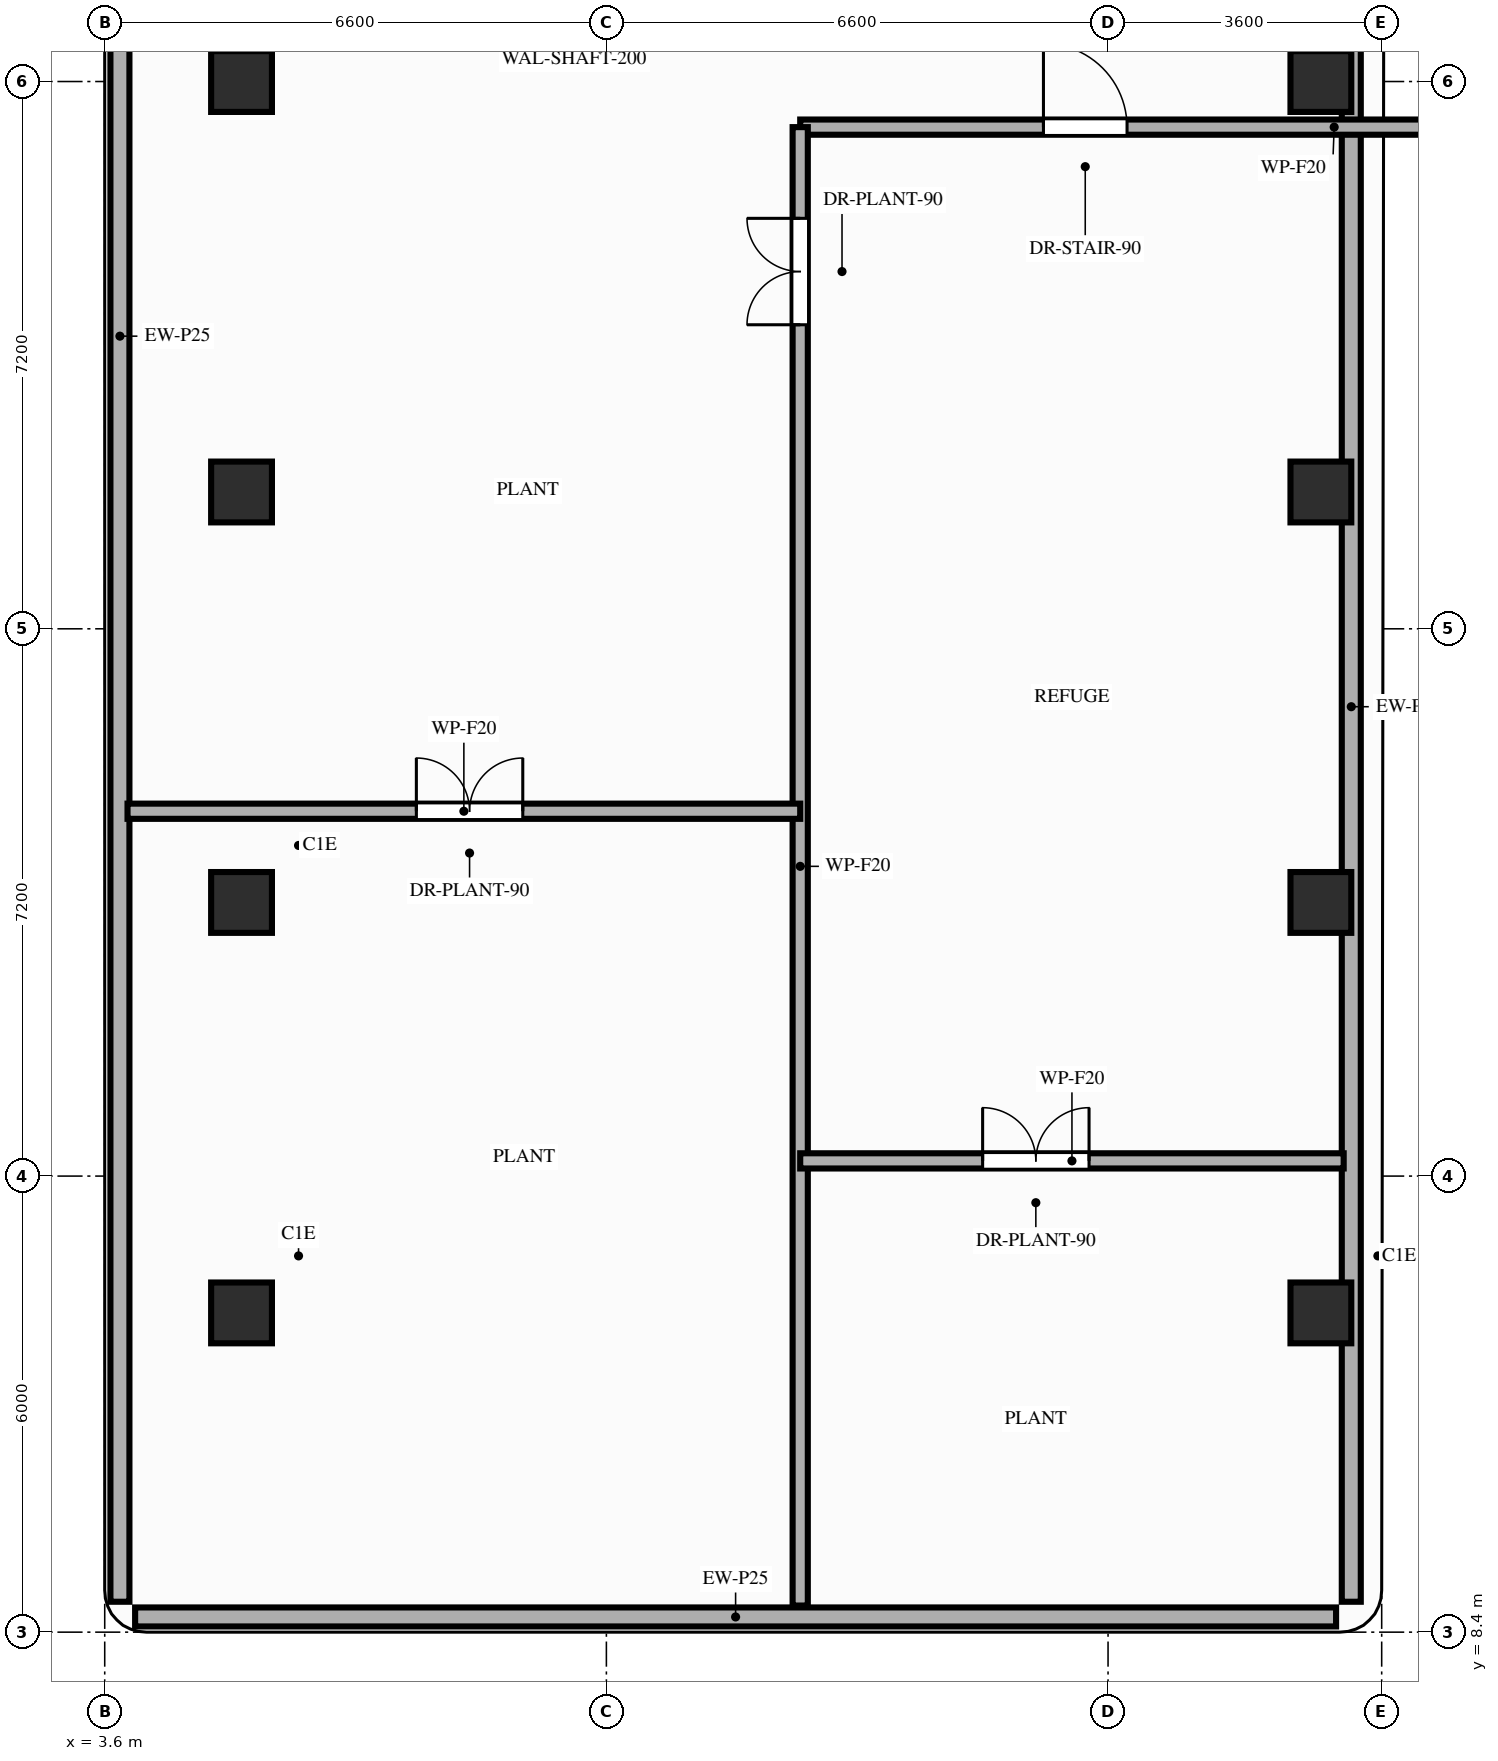
"""IFC4 building model, lengths in metres.
Left out: names, types, materials, properties, quantities, classifications, styles, units other than length and angle.
Written with IfcOpenShell. Run it as: python <this file> out.ifc"""

import sys

from ifc_helpers import new_model, si_unit, direction, frame, frame_2d, origin, origin_2d, place, context, subcontext, project, spatial, rectangle, extrude, element, fill, save


model = new_model("IFC4")
c1 = context("Model", 3, precision=1e-05, world=origin(), true_north=direction((0.0, 1.0)))
c2 = subcontext(c1, "Body", "Model", "MODEL_VIEW")
j1 = project(units=[si_unit("LENGTHUNIT", "METRE"), si_unit("PLANEANGLEUNIT", "RADIAN")], contexts=[c1])
p1 = place(None, origin())
s1 = spatial("IfcSite", under=j1, at=p1, CompositionType="ELEMENT")
p2 = place(p1, origin())
s2 = spatial("IfcBuilding", under=s1, at=p2, CompositionType="ELEMENT")
p3 = place(p2, frame((0.0, 0.0, 214.4)))
s3 = spatial("IfcBuildingStorey", under=s2, at=p3, CompositionType="ELEMENT", Elevation=214.4)
for number, where, z_axis, x_axis in (
    (1, (5.4, 12.6, 0.0), (0.0, 0.0, 1.0), (1.0, 0.0, 0.0)),
    (2, (19.6, 12.6, 0.0), (0.0, 0.0, 1.0), (1.0, 0.0, 0.0)),
    (3, (5.4, 18.0, 0.0), (0.0, 0.0, 1.0), (1.0, 0.0, 0.0)),
    (4, (19.6, 18.0, 0.0), (0.0, 0.0, 1.0), (1.0, 0.0, 0.0)),
    (5, (5.4, 23.4, 0.0), (0.0, 0.0, 1.0), (1.0, 0.0, 0.0)),
    (6, (19.6, 23.4, 0.0), (0.0, 0.0, 1.0), (1.0, 0.0, 0.0)),
    (7, (5.4, 28.8, 0.0), (0.0, 0.0, 1.0), (1.0, 0.0, 0.0)),
    (8, (19.6, 28.8, 0.0), (0.0, 0.0, 1.0), (1.0, 0.0, 0.0)),
):
    element("IfcColumn", number, at=place(p3, frame(where, z_axis=z_axis, x_axis=x_axis)), inside=s3, PredefinedType="COLUMN", context=c2, shape_type="SweptSolid", body=[
        extrude(rectangle(XDim=0.8, YDim=0.8, at=origin_2d()), origin(), (0.0, 0.0, 1.0), 4.0),
    ])
p4 = place(p3, frame((4.0, 8.6, 0.0), z_axis=(0.0, 0.0, 1.0), x_axis=(1.0, 0.0, 0.0)))
e9 = element("IfcWall", 9, at=p4, inside=s3, PredefinedType="STANDARD", context=c2, shape_type="SweptSolid", body=[
    extrude(rectangle(XDim=15.8, YDim=0.25, at=frame_2d((7.9, 0.0))), origin(), (0.0, 0.0, 1.0), 3.82),
])
p5 = place(p3, frame((3.8, 42.1, 0.0), z_axis=(0.0, 0.0, 1.0), x_axis=(0.0, -1.0, 0.0)))
e10 = element("IfcWall", 10, at=p5, inside=s3, PredefinedType="STANDARD", context=c2, shape_type="SweptSolid", body=[
    extrude(rectangle(XDim=33.3, YDim=0.25, at=frame_2d((16.65, 0.0))), origin(), (0.0, 0.0, 1.0), 3.51),
])
p6 = place(p3, frame((20.0, 8.8, 0.0), z_axis=(0.0, 0.0, 1.0), x_axis=(0.0, 1.0, 0.0)))
e11 = element("IfcWall", 11, at=p6, inside=s3, PredefinedType="STANDARD", context=c2, shape_type="SweptSolid", body=[
    extrude(rectangle(XDim=23.55, YDim=0.25, at=frame_2d((11.775, 0.0))), origin(), (0.0, 0.0, 1.0), 3.31),
])
p7 = place(p3, frame((12.75, 28.2, 0.0), z_axis=(0.0, 0.0, 1.0), x_axis=(1.0, 0.0, 0.0)))
e12 = element("IfcWall", 12, at=p7, inside=s3, PredefinedType="PARTITIONING", context=c2, shape_type="SweptSolid", body=[
    extrude(rectangle(XDim=14.05, YDim=0.2, at=frame_2d((7.025, 0.0))), origin(), (0.0, 0.0, 1.0), 3.31),
])
p8 = place(p7, frame((3.2, 0.0, 0.0)))
e13 = element("IfcOpeningElement", 13, at=p8, cuts=e12, PredefinedType="OPENING", context=c2, shape_type="SweptSolid", body=[
    extrude(rectangle(XDim=1.1, YDim=2.15, at=frame_2d((0.55, 1.075))), frame((0.0, 0.11, 0.0), z_axis=(0.0, -1.0, 0.0), x_axis=(1.0, 0.0, 0.0)), (0.0, 0.0, 1.0), 0.22),
])
p9 = place(p3, frame((12.75, 8.75, 0.0), z_axis=(0.0, 0.0, 1.0), x_axis=(0.0, 1.0, 0.0)))
e14 = element("IfcWall", 14, at=p9, inside=s3, PredefinedType="PARTITIONING", context=c2, shape_type="SweptSolid", body=[
    extrude(rectangle(XDim=19.45, YDim=0.2, at=frame_2d((9.725, 0.0))), origin(), (0.0, 0.0, 1.0), 3.31),
])
p10 = place(p9, frame((16.85, 0.0, 0.0)))
e15 = element("IfcOpeningElement", 15, at=p10, cuts=e14, PredefinedType="OPENING", context=c2, shape_type="SweptSolid", body=[
    extrude(rectangle(XDim=1.4, YDim=2.2, at=frame_2d((0.7, 1.1))), frame((0.0, 0.11, 0.0), z_axis=(0.0, -1.0, 0.0), x_axis=(1.0, 0.0, 0.0)), (0.0, 0.0, 1.0), 0.22),
])
p11 = place(p3, frame((12.75, 14.6, 0.0), z_axis=(0.0, 0.0, 1.0), x_axis=(1.0, 0.0, 0.0)))
e16 = element("IfcWall", 16, at=p11, inside=s3, PredefinedType="PARTITIONING", context=c2, shape_type="SweptSolid", body=[
    extrude(rectangle(XDim=7.15, YDim=0.2, at=frame_2d((3.575, 0.0))), origin(), (0.0, 0.0, 1.0), 3.31),
])
p12 = place(p11, frame((2.4, 0.0, 0.0)))
e17 = element("IfcOpeningElement", 17, at=p12, cuts=e16, PredefinedType="OPENING", context=c2, shape_type="SweptSolid", body=[
    extrude(rectangle(XDim=1.4, YDim=2.2, at=frame_2d((0.7, 1.1))), frame((0.0, 0.11, 0.0), z_axis=(0.0, -1.0, 0.0), x_axis=(1.0, 0.0, 0.0)), (0.0, 0.0, 1.0), 0.22),
])
p13 = place(p3, frame((3.9, 19.2, 0.0), z_axis=(0.0, 0.0, 1.0), x_axis=(1.0, 0.0, 0.0)))
e18 = element("IfcWall", 18, at=p13, inside=s3, PredefinedType="PARTITIONING", context=c2, shape_type="SweptSolid", body=[
    extrude(rectangle(XDim=8.85, YDim=0.2, at=frame_2d((4.425, 0.0))), origin(), (0.0, 0.0, 1.0), 3.31),
])
p14 = place(p13, frame((3.8, 0.0, 0.0)))
e19 = element("IfcOpeningElement", 19, at=p14, cuts=e18, PredefinedType="OPENING", context=c2, shape_type="SweptSolid", body=[
    extrude(rectangle(XDim=1.4, YDim=2.2, at=frame_2d((0.7, 1.1))), frame((0.0, 0.11, 0.0), z_axis=(0.0, -1.0, 0.0), x_axis=(1.0, 0.0, 0.0)), (0.0, 0.0, 1.0), 0.22),
])
p15 = place(p8, origin())
e20 = element("IfcDoor", 20, at=p15, inside=s3, OperationType="SINGLE_SWING_LEFT", PredefinedType="DOOR", context=c2, shape_type="SweptSolid", body=[
    extrude(rectangle(XDim=1.1, YDim=2.15, at=frame_2d((0.55, 1.075))), frame((0.0, 0.025, 0.0), z_axis=(0.0, -1.0, 0.0), x_axis=(1.0, 0.0, 0.0)), (0.0, 0.0, 1.0), 0.05),
])
fill(e13, e20)
p16 = place(p10, origin())
e21 = element("IfcDoor", 21, at=p16, inside=s3, OperationType="DOUBLE_DOOR_SINGLE_SWING", PredefinedType="DOOR", context=c2, shape_type="SweptSolid", body=[
    extrude(rectangle(XDim=1.4, YDim=2.2, at=frame_2d((0.7, 1.1))), frame((0.0, 0.025, 0.0), z_axis=(0.0, -1.0, 0.0), x_axis=(1.0, 0.0, 0.0)), (0.0, 0.0, 1.0), 0.05),
])
fill(e15, e21)
p17 = place(p14, origin())
e22 = element("IfcDoor", 22, at=p17, inside=s3, OperationType="DOUBLE_DOOR_SINGLE_SWING", PredefinedType="DOOR", context=c2, shape_type="SweptSolid", body=[
    extrude(rectangle(XDim=1.4, YDim=2.2, at=frame_2d((0.7, 1.1))), frame((0.0, 0.025, 0.0), z_axis=(0.0, -1.0, 0.0), x_axis=(1.0, 0.0, 0.0)), (0.0, 0.0, 1.0), 0.05),
])
fill(e19, e22)
p18 = place(p12, origin())
e23 = element("IfcDoor", 23, at=p18, inside=s3, OperationType="DOUBLE_DOOR_SINGLE_SWING", PredefinedType="DOOR", context=c2, shape_type="SweptSolid", body=[
    extrude(rectangle(XDim=1.4, YDim=2.2, at=frame_2d((0.7, 1.1))), frame((0.0, 0.025, 0.0), z_axis=(0.0, -1.0, 0.0), x_axis=(1.0, 0.0, 0.0)), (0.0, 0.0, 1.0), 0.05),
])
fill(e17, e23)
save(model, sys.argv[1])
